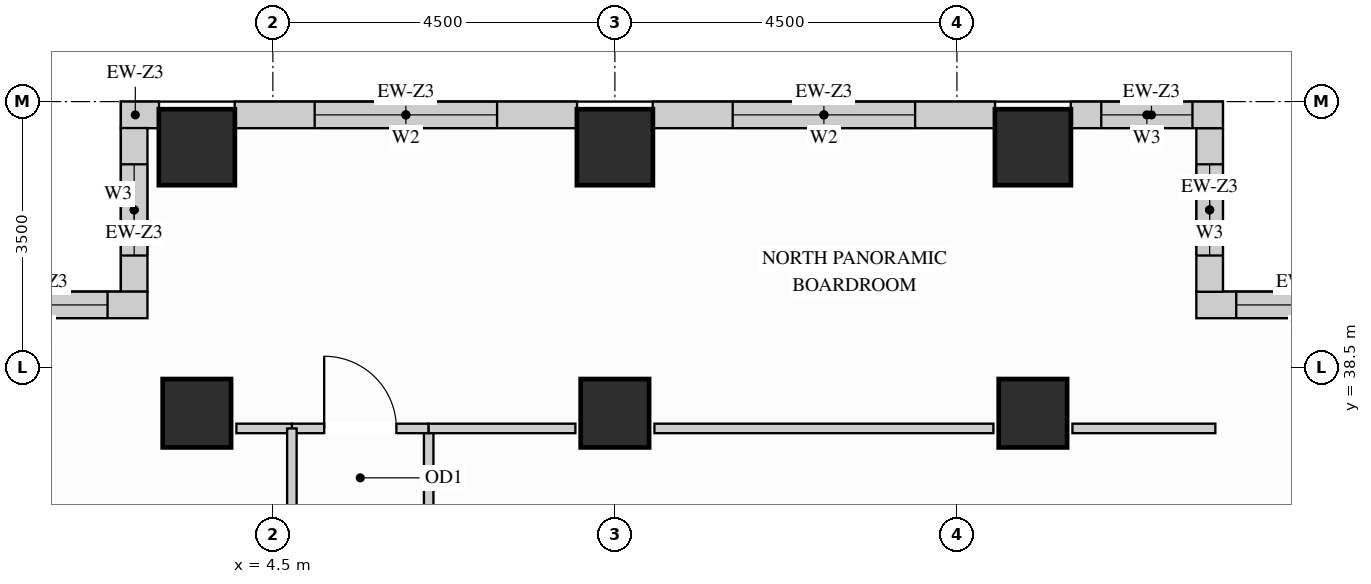
"""IFC4 building model, lengths in metres.
Left out: names, types, materials, properties, quantities, classifications, styles, units other than length and angle.
Written with IfcOpenShell. Run it as: python <this file> out.ifc"""

import sys

from ifc_helpers import new_model, si_unit, direction, frame, frame_2d, origin, origin_2d, place, context, subcontext, project, spatial, rectangle, extrude, source, transform, mapped, element, fill, save


model = new_model("IFC4")
c1 = context("Model", 3, precision=1e-05, world=origin(), true_north=direction((0.0, 1.0)))
c2 = subcontext(c1, "Body", "Model", "MODEL_VIEW")
j1 = project(units=[si_unit("LENGTHUNIT", "METRE"), si_unit("PLANEANGLEUNIT", "RADIAN")], contexts=[c1])
p1 = place(None, origin())
s1 = spatial("IfcSite", under=j1, at=p1, CompositionType="ELEMENT")
p2 = place(p1, origin())
s2 = spatial("IfcBuilding", under=s1, at=p2, CompositionType="ELEMENT")
p3 = place(p2, frame((0.0, 0.0, 204.3)))
s3 = spatial("IfcBuildingStorey", under=s2, at=p3, CompositionType="ELEMENT", Elevation=204.3)
m1 = source(origin(), c2, "Body", "SweptSolid", [
    extrude(rectangle(XDim=0.9, YDim=0.9, at=origin_2d()), origin(), (0.0, 0.0, 1.0), 3.32),
])
for number, where, z_axis, x_axis in (
    (1, (14.5, 37.9, 0.0), (0.0, 0.0, 1.0), (1.0, 0.0, 0.0)),
    (2, (3.5, 37.9, 0.0), (0.0, 0.0, 1.0), (1.0, 0.0, 0.0)),
    (3, (9.0, 37.9, 0.0), (0.0, 0.0, 1.0), (1.0, 0.0, 0.0)),
):
    element("IfcColumn", number, at=place(p3, frame(where, z_axis=z_axis, x_axis=x_axis)), inside=s3, PredefinedType="COLUMN", context=c2, shape_type="MappedRepresentation", body=[
        mapped(m1, transform((0.0, 0.0, 0.0), x_axis=(1.0, 0.0, 0.0), y_axis=(0.0, 1.0, 0.0), z_axis=(0.0, 0.0, 1.0))),
    ])
m2 = source(origin(), c2, "Body", "SweptSolid", [
    extrude(rectangle(XDim=1.0, YDim=1.0, at=origin_2d()), origin(), (0.0, 0.0, 1.0), 3.32),
])
for number, where, z_axis, x_axis in (
    (4, (14.5, 41.4, 0.0), (0.0, 0.0, 1.0), (1.0, 0.0, 0.0)),
    (5, (3.5, 41.4, 0.0), (0.0, 0.0, 1.0), (1.0, 0.0, 0.0)),
    (6, (9.0, 41.4, 0.0), (0.0, 0.0, 1.0), (1.0, 0.0, 0.0)),
):
    element("IfcColumn", number, at=place(p3, frame(where, z_axis=z_axis, x_axis=x_axis)), inside=s3, PredefinedType="COLUMN", context=c2, shape_type="MappedRepresentation", body=[
        mapped(m2, transform((0.0, 0.0, 0.0), x_axis=(1.0, 0.0, 0.0), y_axis=(0.0, 1.0, 0.0), z_axis=(0.0, 0.0, 1.0))),
    ])
p4 = place(p3, frame((19.5, 39.325, 0.0), z_axis=(0.0, 0.0, 1.0), x_axis=(-1.0, 0.0, 0.0)))
e7 = element("IfcWall", 7, at=p4, inside=s3, PredefinedType="SOLIDWALL", context=c2, shape_type="SweptSolid", body=[
    extrude(rectangle(XDim=2.85, YDim=0.35, at=frame_2d((1.425, 0.0))), origin(), (0.0, 0.0, 1.0), 3.305),
])
p5 = place(p4, frame((0.525, 0.0, 0.78)))
e8 = element("IfcOpeningElement", 8, at=p5, cuts=e7, PredefinedType="OPENING", context=c2, shape_type="SweptSolid", body=[
    extrude(rectangle(XDim=1.8, YDim=2.1, at=frame_2d((0.9, 1.05))), frame((0.0, 0.185, 0.0), z_axis=(0.0, -1.0, 0.0), x_axis=(1.0, 0.0, 0.0)), (0.0, 0.0, 1.0), 0.37),
])
p6 = place(p3, frame((16.825, 39.498, 0.0), z_axis=(0.0, 0.0, 1.0), x_axis=(0.0, 1.0, 0.0)))
e9 = element("IfcWall", 9, at=p6, inside=s3, PredefinedType="SOLIDWALL", context=c2, shape_type="SweptSolid", body=[
    extrude(rectangle(XDim=2.154, YDim=0.35, at=frame_2d((1.077, 0.0))), origin(), (0.0, 0.0, 1.0), 3.305),
])
p7 = place(p6, frame((0.477, 0.0, 0.78)))
e10 = element("IfcOpeningElement", 10, at=p7, cuts=e9, PredefinedType="OPENING", context=c2, shape_type="SweptSolid", body=[
    extrude(rectangle(XDim=1.2, YDim=2.1, at=frame_2d((0.6, 1.05))), frame((0.0, 0.185, 0.0), z_axis=(0.0, -1.0, 0.0), x_axis=(1.0, 0.0, 0.0)), (0.0, 0.0, 1.0), 0.37),
])
p8 = place(p3, frame((17.0, 41.825, 0.0), z_axis=(0.0, 0.0, 1.0), x_axis=(-1.0, 0.0, 0.0)))
e11 = element("IfcWall", 11, at=p8, inside=s3, PredefinedType="SOLIDWALL", context=c2, shape_type="SweptSolid", body=[
    extrude(rectangle(XDim=2.002, YDim=0.35, at=frame_2d((1.001, 0.0))), origin(), (0.0, 0.0, 1.0), 3.305),
])
p9 = place(p8, frame((0.401, 0.0, 0.78)))
e12 = element("IfcOpeningElement", 12, at=p9, cuts=e11, PredefinedType="OPENING", context=c2, shape_type="SweptSolid", body=[
    extrude(rectangle(XDim=1.2, YDim=2.1, at=frame_2d((0.6, 1.05))), frame((0.0, 0.185, 0.0), z_axis=(0.0, -1.0, 0.0), x_axis=(1.0, 0.0, 0.0)), (0.0, 0.0, 1.0), 0.37),
])
p10 = place(p3, frame((14.002, 41.825, 0.0), z_axis=(0.0, 0.0, 1.0), x_axis=(-1.0, 0.0, 0.0)))
e13 = element("IfcWall", 13, at=p10, inside=s3, PredefinedType="SOLIDWALL", context=c2, shape_type="SweptSolid", body=[
    extrude(rectangle(XDim=4.504, YDim=0.35, at=frame_2d((2.252, 0.0))), origin(), (0.0, 0.0, 1.0), 2.532),
])
p11 = place(p10, frame((1.052, 0.0, 0.78)))
e14 = element("IfcOpeningElement", 14, at=p11, cuts=e13, PredefinedType="OPENING", context=c2, shape_type="SweptSolid", body=[
    extrude(rectangle(XDim=2.4, YDim=1.572, at=frame_2d((1.2, 0.786))), frame((0.0, 0.185, 0.0), z_axis=(0.0, -1.0, 0.0), x_axis=(1.0, 0.0, 0.0)), (0.0, 0.0, 1.0), 0.37),
])
p12 = place(p3, frame((8.502, 41.825, 0.0), z_axis=(0.0, 0.0, 1.0), x_axis=(-1.0, 0.0, 0.0)))
e15 = element("IfcWall", 15, at=p12, inside=s3, PredefinedType="SOLIDWALL", context=c2, shape_type="SweptSolid", body=[
    extrude(rectangle(XDim=4.504, YDim=0.35, at=frame_2d((2.252, 0.0))), origin(), (0.0, 0.0, 1.0), 2.532),
])
p13 = place(p12, frame((1.052, 0.0, 0.78)))
e16 = element("IfcOpeningElement", 16, at=p13, cuts=e15, PredefinedType="OPENING", context=c2, shape_type="SweptSolid", body=[
    extrude(rectangle(XDim=2.4, YDim=1.572, at=frame_2d((1.2, 0.786))), frame((0.0, 0.185, 0.0), z_axis=(0.0, -1.0, 0.0), x_axis=(1.0, 0.0, 0.0)), (0.0, 0.0, 1.0), 0.37),
])
m3 = source(origin(), c2, "Body", "SweptSolid", [
    extrude(rectangle(XDim=0.502, YDim=0.35, at=frame_2d((0.251, 0.0))), origin(), (0.0, 0.0, 1.0), 3.305),
])
p14 = place(p3, frame((3.002, 41.825, 0.0), z_axis=(0.0, 0.0, 1.0), x_axis=(-1.0, 0.0, 0.0)))
e17 = element("IfcWall", 17, at=p14, inside=s3, PredefinedType="SOLIDWALL", context=c2, shape_type="MappedRepresentation", body=[
    mapped(m3, transform((0.0, 0.0, 0.0), x_axis=(1.0, 0.0, 0.0), y_axis=(0.0, 1.0, 0.0), z_axis=(0.0, 0.0, 1.0))),
])
p15 = place(p3, frame((2.675, 41.652, 0.0), z_axis=(0.0, 0.0, 1.0), x_axis=(0.0, -1.0, 0.0)))
e18 = element("IfcWall", 18, at=p15, inside=s3, PredefinedType="SOLIDWALL", context=c2, shape_type="SweptSolid", body=[
    extrude(rectangle(XDim=2.154, YDim=0.35, at=frame_2d((1.077, 0.0))), origin(), (0.0, 0.0, 1.0), 3.305),
])
p16 = place(p15, frame((0.477, 0.0, 0.78)))
e19 = element("IfcOpeningElement", 19, at=p16, cuts=e18, PredefinedType="OPENING", context=c2, shape_type="SweptSolid", body=[
    extrude(rectangle(XDim=1.2, YDim=2.1, at=frame_2d((0.6, 1.05))), frame((0.0, 0.185, 0.0), z_axis=(0.0, -1.0, 0.0), x_axis=(1.0, 0.0, 0.0)), (0.0, 0.0, 1.0), 0.37),
])
p17 = place(p3, frame((2.85, 39.325, 0.0), z_axis=(0.0, 0.0, 1.0), x_axis=(-1.0, 0.0, 0.0)))
e20 = element("IfcWall", 20, at=p17, inside=s3, PredefinedType="SOLIDWALL", context=c2, shape_type="SweptSolid", body=[
    extrude(rectangle(XDim=2.85, YDim=0.35, at=frame_2d((1.425, 0.0))), origin(), (0.0, 0.0, 1.0), 3.305),
])
p18 = place(p17, frame((0.525, 0.0, 0.78)))
e21 = element("IfcOpeningElement", 21, at=p18, cuts=e20, PredefinedType="OPENING", context=c2, shape_type="SweptSolid", body=[
    extrude(rectangle(XDim=1.8, YDim=2.1, at=frame_2d((0.9, 1.05))), frame((0.0, 0.185, 0.0), z_axis=(0.0, -1.0, 0.0), x_axis=(1.0, 0.0, 0.0)), (0.0, 0.0, 1.0), 0.37),
])
p19 = place(p3, frame((6.55, 34.625, 0.0), z_axis=(0.0, 0.0, 1.0), x_axis=(0.0, 1.0, 0.0)))
e22 = element("IfcWall", 22, at=p19, inside=s3, PredefinedType="PARTITIONING", context=c2, shape_type="SweptSolid", body=[
    extrude(rectangle(XDim=3.075, YDim=0.125, at=frame_2d((1.538, 0.0))), origin(), (0.0, 0.0, 1.0), 3.305),
])
p20 = place(p19, frame((1.062, 0.0, 0.0)))
e23 = element("IfcOpeningElement", 23, at=p20, cuts=e22, PredefinedType="OPENING", context=c2, shape_type="SweptSolid", body=[
    extrude(rectangle(XDim=0.95, YDim=2.15, at=frame_2d((0.475, 1.075))), frame((0.0, 0.073, 0.0), z_axis=(0.0, -1.0, 0.0), x_axis=(1.0, 0.0, 0.0)), (0.0, 0.0, 1.0), 0.145),
])
p21 = place(p3, frame((4.75, 37.7, 0.0), z_axis=(0.0, 0.0, 1.0), x_axis=(1.0, 0.0, 0.0)))
e24 = element("IfcWall", 24, at=p21, inside=s3, PredefinedType="PARTITIONING", context=c2, shape_type="SweptSolid", body=[
    extrude(rectangle(XDim=1.8, YDim=0.125, at=frame_2d((0.9, 0.0))), origin(), (0.0, 0.0, 1.0), 2.693),
])
p22 = place(p21, frame((0.425, 0.0, 0.0)))
e25 = element("IfcOpeningElement", 25, at=p22, cuts=e24, PredefinedType="OPENING", context=c2, shape_type="SweptSolid", body=[
    extrude(rectangle(XDim=0.95, YDim=2.15, at=frame_2d((0.475, 1.075))), frame((0.0, 0.073, 0.0), z_axis=(0.0, -1.0, 0.0), x_axis=(1.0, 0.0, 0.0)), (0.0, 0.0, 1.0), 0.145),
])
m4 = source(origin(), c2, "Body", "SweptSolid", [
    extrude(rectangle(XDim=1.93, YDim=0.125, at=frame_2d((0.965, 0.0))), origin(), (0.0, 0.0, 1.0), 2.693),
])
p23 = place(p3, frame((6.55, 37.7, 0.0), z_axis=(0.0, 0.0, 1.0), x_axis=(1.0, 0.0, 0.0)))
e26 = element("IfcWall", 26, at=p23, inside=s3, PredefinedType="PARTITIONING", context=c2, shape_type="MappedRepresentation", body=[
    mapped(m4, transform((0.0, 0.0, 0.0), x_axis=(1.0, 0.0, 0.0), y_axis=(0.0, 1.0, 0.0), z_axis=(0.0, 0.0, 1.0))),
])
m5 = source(origin(), c2, "Body", "SweptSolid", [
    extrude(rectangle(XDim=4.46, YDim=0.125, at=frame_2d((2.23, 0.0))), origin(), (0.0, 0.0, 1.0), 2.693),
])
p24 = place(p3, frame((9.52, 37.7, 0.0), z_axis=(0.0, 0.0, 1.0), x_axis=(1.0, 0.0, 0.0)))
e27 = element("IfcWall", 27, at=p24, inside=s3, PredefinedType="PARTITIONING", context=c2, shape_type="MappedRepresentation", body=[
    mapped(m5, transform((0.0, 0.0, 0.0), x_axis=(1.0, 0.0, 0.0), y_axis=(0.0, 1.0, 0.0), z_axis=(0.0, 0.0, 1.0))),
])
m6 = source(origin(), c2, "Body", "SweptSolid", [
    extrude(rectangle(XDim=1.88, YDim=0.125, at=frame_2d((0.94, 0.0))), origin(), (0.0, 0.0, 1.0), 2.693),
])
p25 = place(p3, frame((15.02, 37.7, 0.0), z_axis=(0.0, 0.0, 1.0), x_axis=(1.0, 0.0, 0.0)))
e28 = element("IfcWall", 28, at=p25, inside=s3, PredefinedType="PARTITIONING", context=c2, shape_type="MappedRepresentation", body=[
    mapped(m6, transform((0.0, 0.0, 0.0), x_axis=(1.0, 0.0, 0.0), y_axis=(0.0, 1.0, 0.0), z_axis=(0.0, 0.0, 1.0))),
])
m7 = source(origin(), c2, "Body", "SweptSolid", [
    extrude(rectangle(XDim=0.73, YDim=0.125, at=frame_2d((0.365, 0.0))), origin(), (0.0, 0.0, 1.0), 2.693),
])
p26 = place(p3, frame((4.02, 37.7, 0.0), z_axis=(0.0, 0.0, 1.0), x_axis=(1.0, 0.0, 0.0)))
e29 = element("IfcWall", 29, at=p26, inside=s3, PredefinedType="PARTITIONING", context=c2, shape_type="MappedRepresentation", body=[
    mapped(m7, transform((0.0, 0.0, 0.0), x_axis=(1.0, 0.0, 0.0), y_axis=(0.0, 1.0, 0.0), z_axis=(0.0, 0.0, 1.0))),
])
p27 = place(p3, frame((4.75, 34.625, 0.0), z_axis=(0.0, 0.0, 1.0), x_axis=(0.0, 1.0, 0.0)))
e30 = element("IfcWall", 30, at=p27, inside=s3, PredefinedType="PARTITIONING", context=c2, shape_type="SweptSolid", body=[
    extrude(rectangle(XDim=3.075, YDim=0.125, at=frame_2d((1.538, 0.0))), origin(), (0.0, 0.0, 1.0), 3.305),
])
p28 = place(p27, frame((1.062, 0.0, 0.0)))
e31 = element("IfcOpeningElement", 31, at=p28, cuts=e30, PredefinedType="OPENING", context=c2, shape_type="SweptSolid", body=[
    extrude(rectangle(XDim=0.95, YDim=2.15, at=frame_2d((0.475, 1.075))), frame((0.0, 0.073, 0.0), z_axis=(0.0, -1.0, 0.0), x_axis=(1.0, 0.0, 0.0)), (0.0, 0.0, 1.0), 0.145),
])
m8 = source(origin(), c2, "Body", "SweptSolid", [
    extrude(rectangle(XDim=0.95, YDim=2.15, at=frame_2d((0.475, 1.075))), frame((0.0, 0.025, 0.0), z_axis=(0.0, -1.0, 0.0), x_axis=(1.0, 0.0, 0.0)), (0.0, 0.0, 1.0), 0.05),
])
p29 = place(p22, origin())
e32 = element("IfcDoor", 32, at=p29, inside=s3, OperationType="SINGLE_SWING_LEFT", PredefinedType="DOOR", context=c2, shape_type="MappedRepresentation", body=[
    mapped(m8, transform((0.0, 0.0, 0.0), x_axis=(1.0, 0.0, 0.0), y_axis=(0.0, 1.0, 0.0), z_axis=(0.0, 0.0, 1.0))),
])
fill(e25, e32)
m9 = source(origin(), c2, "Body", "SweptSolid", [
    extrude(rectangle(XDim=1.8, YDim=2.1, at=frame_2d((0.9, 1.05))), frame((0.0, 0.03, 0.0), z_axis=(0.0, -1.0, 0.0), x_axis=(1.0, 0.0, 0.0)), (0.0, 0.0, 1.0), 0.06),
])
p30 = place(p5, origin())
e33 = element("IfcWindow", 33, at=p30, inside=s3, PartitioningType="SINGLE_PANEL", PredefinedType="WINDOW", context=c2, shape_type="MappedRepresentation", body=[
    mapped(m9, transform((0.0, 0.0, 0.0), x_axis=(1.0, 0.0, 0.0), y_axis=(0.0, 1.0, 0.0), z_axis=(0.0, 0.0, 1.0))),
])
fill(e8, e33)
p31 = place(p18, origin())
e34 = element("IfcWindow", 34, at=p31, inside=s3, PartitioningType="SINGLE_PANEL", PredefinedType="WINDOW", context=c2, shape_type="MappedRepresentation", body=[
    mapped(m9, transform((0.0, 0.0, 0.0), x_axis=(1.0, 0.0, 0.0), y_axis=(0.0, 1.0, 0.0), z_axis=(0.0, 0.0, 1.0))),
])
fill(e21, e34)
m10 = source(origin(), c2, "Body", "SweptSolid", [
    extrude(rectangle(XDim=2.4, YDim=1.572, at=frame_2d((1.2, 0.786))), frame((0.0, 0.03, 0.0), z_axis=(0.0, -1.0, 0.0), x_axis=(1.0, 0.0, 0.0)), (0.0, 0.0, 1.0), 0.06),
])
p32 = place(p11, origin())
e35 = element("IfcWindow", 35, at=p32, inside=s3, PartitioningType="SINGLE_PANEL", PredefinedType="WINDOW", context=c2, shape_type="MappedRepresentation", body=[
    mapped(m10, transform((0.0, 0.0, 0.0), x_axis=(1.0, 0.0, 0.0), y_axis=(0.0, 1.0, 0.0), z_axis=(0.0, 0.0, 1.0))),
])
fill(e14, e35)
p33 = place(p13, origin())
e36 = element("IfcWindow", 36, at=p33, inside=s3, PartitioningType="SINGLE_PANEL", PredefinedType="WINDOW", context=c2, shape_type="MappedRepresentation", body=[
    mapped(m10, transform((0.0, 0.0, 0.0), x_axis=(1.0, 0.0, 0.0), y_axis=(0.0, 1.0, 0.0), z_axis=(0.0, 0.0, 1.0))),
])
fill(e16, e36)
m11 = source(origin(), c2, "Body", "SweptSolid", [
    extrude(rectangle(XDim=1.2, YDim=2.1, at=frame_2d((0.6, 1.05))), frame((0.0, 0.03, 0.0), z_axis=(0.0, -1.0, 0.0), x_axis=(1.0, 0.0, 0.0)), (0.0, 0.0, 1.0), 0.06),
])
p34 = place(p7, origin())
e37 = element("IfcWindow", 37, at=p34, inside=s3, PartitioningType="SINGLE_PANEL", PredefinedType="WINDOW", context=c2, shape_type="MappedRepresentation", body=[
    mapped(m11, transform((0.0, 0.0, 0.0), x_axis=(1.0, 0.0, 0.0), y_axis=(0.0, 1.0, 0.0), z_axis=(0.0, 0.0, 1.0))),
])
fill(e10, e37)
p35 = place(p9, origin())
e38 = element("IfcWindow", 38, at=p35, inside=s3, PartitioningType="SINGLE_PANEL", PredefinedType="WINDOW", context=c2, shape_type="MappedRepresentation", body=[
    mapped(m11, transform((0.0, 0.0, 0.0), x_axis=(1.0, 0.0, 0.0), y_axis=(0.0, 1.0, 0.0), z_axis=(0.0, 0.0, 1.0))),
])
fill(e12, e38)
p36 = place(p16, origin())
e39 = element("IfcWindow", 39, at=p36, inside=s3, PartitioningType="SINGLE_PANEL", PredefinedType="WINDOW", context=c2, shape_type="MappedRepresentation", body=[
    mapped(m11, transform((0.0, 0.0, 0.0), x_axis=(1.0, 0.0, 0.0), y_axis=(0.0, 1.0, 0.0), z_axis=(0.0, 0.0, 1.0))),
])
fill(e19, e39)
save(model, sys.argv[1])
